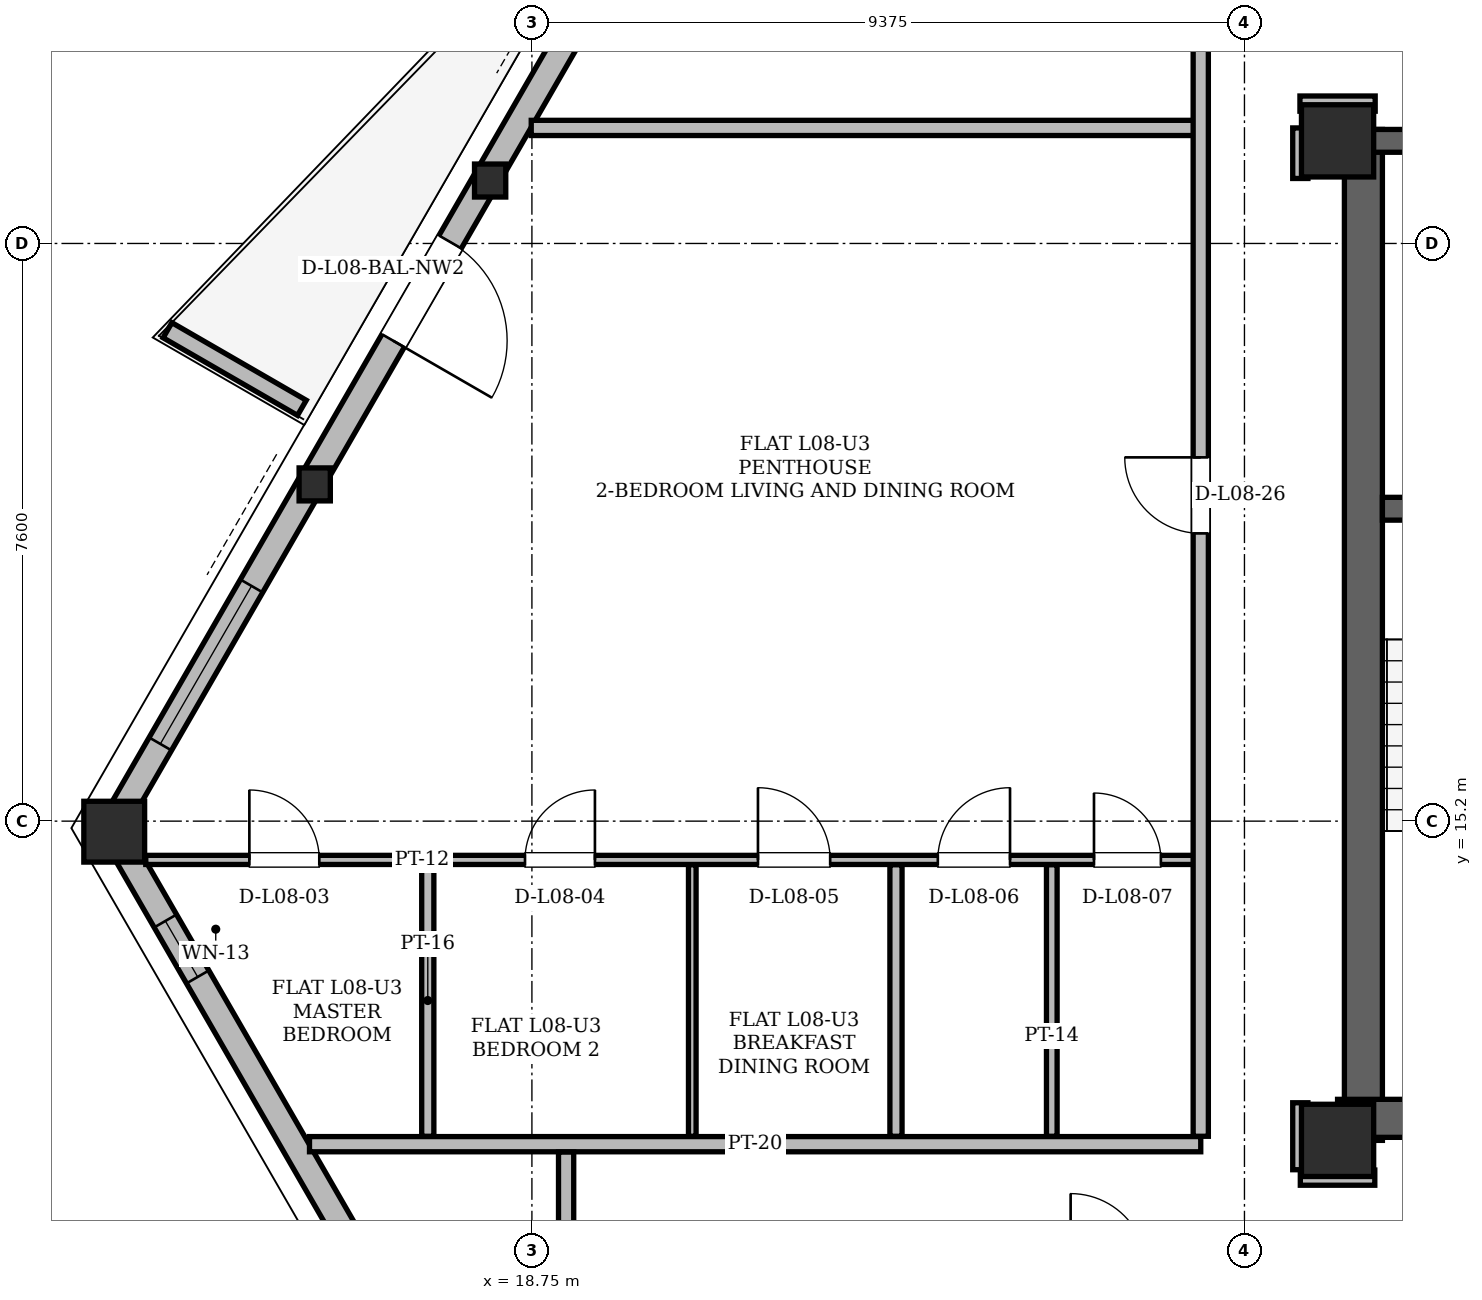
"""IFC4 building model, lengths in metres.
Left out: names, types, materials, properties, quantities, classifications, styles, units other than length and angle.
Written with IfcOpenShell. Run it as: python <this file> out.ifc"""

import sys

from ifc_helpers import new_model, si_unit, direction, frame, frame_2d, origin, origin_2d, place, context, subcontext, project, spatial, polyline, rectangle, hollow_rectangle, i_section, outline, extrude, element, fill, save


model = new_model("IFC4")
c1 = context("Model", 3, precision=1e-05, world=origin(), true_north=direction((0.0, 1.0)))
c2 = subcontext(c1, "Body", "Model", "MODEL_VIEW")
j1 = project(units=[si_unit("LENGTHUNIT", "METRE"), si_unit("PLANEANGLEUNIT", "RADIAN")], contexts=[c1])
p1 = place(None, origin())
s1 = spatial("IfcSite", under=j1, at=p1, CompositionType="ELEMENT")
p2 = place(p1, origin())
s2 = spatial("IfcBuilding", under=s1, at=p2, CompositionType="ELEMENT")
p3 = place(p2, frame((0.0, 0.0, 34.5)))
s3 = spatial("IfcBuildingStorey", under=s2, at=p3, CompositionType="ELEMENT", Elevation=34.5)
for number, where, z_axis, x_axis in (
    (1, (29.35, 11.0, 0.0), (0.0, 0.0, 1.0), (1.0, 0.0, 0.0)),
    (2, (29.35, 24.15, 0.0), (0.0, 0.0, 1.0), (1.0, 0.0, 0.0)),
):
    element("IfcColumn", number, at=place(p3, frame(where, z_axis=z_axis, x_axis=x_axis)), inside=s3, PredefinedType="COLUMN", context=c2, shape_type="SweptSolid", body=[
        extrude(hollow_rectangle(XDim=0.95, YDim=0.95, WallThickness=0.08, at=origin_2d()), origin(), (0.0, 0.0, 1.0), 3.6),
    ])
p4 = place(p3, frame((13.222, 15.108, 0.004), z_axis=(0.018142917842, -0.026229087217, 0.999491305373), x_axis=(0.822422232235, 0.568877554422, 0.0)))
e3 = element("IfcColumn", 3, at=p4, inside=s3, PredefinedType="COLUMN", context=c2, shape_type="SweptSolid", body=[
    extrude(hollow_rectangle(XDim=0.8, YDim=0.8, WallThickness=0.065, at=origin_2d()), origin(), (0.0, 0.0, 1.0), 3.593),
])
p5 = place(p3, frame((18.16, 23.662, 0.004), z_axis=(0.022221713768, -0.019163679763, 0.999569381692), x_axis=(0.653077047348, 0.757291469797, 0.0)))
e4 = element("IfcColumn", 4, at=p5, inside=s3, PredefinedType="COLUMN", context=c2, shape_type="SweptSolid", body=[
    extrude(i_section(OverallWidth=0.411, OverallDepth=0.434, WebThickness=0.036, FlangeThickness=0.057, at=origin_2d()), origin(), (0.0, 0.0, 1.0), 3.593),
])
p6 = place(p3, frame((15.856, 19.67, 0.004), z_axis=(0.020318381204, -0.022424969221, 0.999542037205), x_axis=(0.741056784611, 0.67144235939, 0.0)))
e5 = element("IfcColumn", 5, at=p6, inside=s3, PredefinedType="COLUMN", context=c2, shape_type="SweptSolid", body=[
    extrude(i_section(OverallWidth=0.411, OverallDepth=0.434, WebThickness=0.036, FlangeThickness=0.057, at=origin_2d()), origin(), (0.0, 0.0, 1.0), 3.593),
])
p7 = place(p3, frame((29.69, 11.0, 0.0), z_axis=(0.0, 0.0, 1.0), x_axis=(0.0, 1.0, 0.0)))
e6 = element("IfcWall", 6, at=p7, inside=s3, PredefinedType="SHEAR", context=c2, shape_type="SweptSolid", body=[
    extrude(rectangle(XDim=13.3, YDim=0.5, at=frame_2d((6.65, 0.0))), origin(), (0.0, 0.0, 1.0), 3.36),
])
p8 = place(p3, frame((29.35, 11.29, 0.0), z_axis=(0.0, 0.0, 1.0), x_axis=(1.0, 0.0, 0.0)))
e7 = element("IfcWall", 7, at=p8, inside=s3, PredefinedType="SHEAR", context=c2, shape_type="SweptSolid", body=[
    extrude(rectangle(XDim=7.1, YDim=0.5, at=frame_2d((3.55, 0.0))), origin(), (0.0, 0.0, 1.0), 3.36),
])
p9 = place(p3, frame((29.65, 24.15, 0.0), z_axis=(0.0, 0.0, 1.0), x_axis=(1.0, 0.0, 0.0)))
e8 = element("IfcWall", 8, at=p9, inside=s3, PredefinedType="SHEAR", context=c2, shape_type="SweptSolid", body=[
    extrude(rectangle(XDim=15.7, YDim=0.3, at=frame_2d((7.85, 0.0))), origin(), (0.0, 0.0, 1.0), 3.36),
])
p10 = place(p9, frame((1.7, 0.0, 0.0)))
e9 = element("IfcOpeningElement", 9, at=p10, cuts=e8, PredefinedType="OPENING", context=c2, shape_type="SweptSolid", body=[
    extrude(rectangle(XDim=1.2, YDim=2.2, at=frame_2d((0.6, 1.1))), frame((0.0, 0.15, 0.0), z_axis=(0.0, -1.0, 0.0), x_axis=(1.0, 0.0, 0.0)), (0.0, 0.0, 1.0), 0.3),
])
p11 = place(p9, frame((12.8, 0.0, 0.0)))
e10 = element("IfcOpeningElement", 10, at=p11, cuts=e8, PredefinedType="OPENING", context=c2, shape_type="SweptSolid", body=[
    extrude(rectangle(XDim=1.2, YDim=2.2, at=frame_2d((0.6, 1.1))), frame((0.0, 0.15, 0.0), z_axis=(0.0, -1.0, 0.0), x_axis=(1.0, 0.0, 0.0)), (0.0, 0.0, 1.0), 0.3),
])
p12 = place(p9, frame((6.55, 0.0, 0.0)))
e11 = element("IfcOpeningElement", 11, at=p12, cuts=e8, PredefinedType="OPENING", context=c2, shape_type="SweptSolid", body=[
    extrude(rectangle(XDim=0.9, YDim=2.05, at=frame_2d((0.45, 1.025))), frame((0.0, 0.15, 0.0), z_axis=(0.0, -1.0, 0.0), x_axis=(1.0, 0.0, 0.0)), (0.0, 0.0, 1.0), 0.3),
])
p13 = place(p9, frame((8.45, 0.0, 0.0)))
e12 = element("IfcOpeningElement", 12, at=p13, cuts=e8, PredefinedType="OPENING", context=c2, shape_type="SweptSolid", body=[
    extrude(rectangle(XDim=0.9, YDim=2.05, at=frame_2d((0.45, 1.025))), frame((0.0, 0.15, 0.0), z_axis=(0.0, -1.0, 0.0), x_axis=(1.0, 0.0, 0.0)), (0.0, 0.0, 1.0), 0.3),
])
p14 = place(p3, frame((29.94, 19.31, 0.0), z_axis=(0.0, 0.0, 1.0), x_axis=(1.0, 0.0, 0.0)))
e13 = element("IfcWall", 13, at=p14, inside=s3, PredefinedType="SHEAR", context=c2, shape_type="SweptSolid", body=[
    extrude(rectangle(XDim=4.01, YDim=0.3, at=frame_2d((2.005, 0.0))), origin(), (0.0, 0.0, 1.0), 3.36),
])
p15 = place(p14, frame((1.01, 0.0, 0.0)))
e14 = element("IfcOpeningElement", 14, at=p15, cuts=e13, PredefinedType="OPENING", context=c2, shape_type="SweptSolid", body=[
    extrude(rectangle(XDim=1.4, YDim=2.2, at=frame_2d((0.7, 1.1))), frame((0.0, 0.15, 0.0), z_axis=(0.0, -1.0, 0.0), x_axis=(1.0, 0.0, 0.0)), (0.0, 0.0, 1.0), 0.3),
])
p16 = place(p3, frame((13.222, 15.108, 0.0), z_axis=(0.0, 0.0, 1.0), x_axis=(0.499997339613, -0.866026939754, 0.0)))
e15 = element("IfcWall", 15, at=p16, inside=s3, PredefinedType="SOLIDWALL", context=c2, shape_type="SweptSolid", body=[
    extrude(rectangle(XDim=15.632, YDim=0.34, at=frame_2d((7.816, 0.0))), origin(), (0.0, 0.0, 1.0), 2.494),
])
p17 = place(p16, frame((1.411, 0.0, 1.28)))
e16 = element("IfcOpeningElement", 16, at=p17, cuts=e15, PredefinedType="OPENING", context=c2, shape_type="SweptSolid", body=[
    extrude(rectangle(XDim=0.85, YDim=0.92, at=frame_2d((0.425, 0.46))), frame((0.0, 0.17, 0.0), z_axis=(0.0, -1.0, 0.0), x_axis=(1.0, 0.0, 0.0)), (0.0, 0.0, 1.0), 0.34),
])
p18 = place(p3, frame((29.684, 43.621, 0.0), z_axis=(0.0, 0.0, 1.0), x_axis=(-0.499999106891, -0.866025919421, 0.0)))
e17 = element("IfcWall", 17, at=p18, inside=s3, PredefinedType="SOLIDWALL", context=c2, shape_type="SweptSolid", body=[
    extrude(rectangle(XDim=32.924, YDim=0.34, at=frame_2d((16.462, 0.0))), origin(), (0.0, 0.0, 1.0), 2.494),
])
p19 = place(p18, frame((6.159, 0.0, 0.0)))
e18 = element("IfcOpeningElement", 18, at=p19, cuts=e17, PredefinedType="OPENING", context=c2, shape_type="SweptSolid", body=[
    extrude(rectangle(XDim=1.5, YDim=2.2, at=frame_2d((0.75, 1.1))), frame((0.0, 0.17, 0.0), z_axis=(0.0, -1.0, 0.0), x_axis=(1.0, 0.0, 0.0)), (0.0, 0.0, 1.0), 0.34),
])
p20 = place(p18, frame((24.019, 0.0, 0.0)))
e19 = element("IfcOpeningElement", 19, at=p20, cuts=e17, PredefinedType="OPENING", context=c2, shape_type="SweptSolid", body=[
    extrude(rectangle(XDim=1.5, YDim=2.2, at=frame_2d((0.75, 1.1))), frame((0.0, 0.17, 0.0), z_axis=(0.0, -1.0, 0.0), x_axis=(1.0, 0.0, 0.0)), (0.0, 0.0, 1.0), 0.34),
])
p21 = place(p18, frame((29.245, 0.0, 0.85)))
e20 = element("IfcOpeningElement", 20, at=p21, cuts=e17, PredefinedType="OPENING", context=c2, shape_type="SweptSolid", body=[
    extrude(rectangle(XDim=2.4, YDim=1.534, at=frame_2d((1.2, 0.767))), frame((0.0, 0.17, 0.0), z_axis=(0.0, -1.0, 0.0), x_axis=(1.0, 0.0, 0.0)), (0.0, 0.0, 1.0), 0.34),
])
p22 = place(p18, frame((10.753, 0.0, 0.85)))
e21 = element("IfcOpeningElement", 21, at=p22, cuts=e17, PredefinedType="OPENING", context=c2, shape_type="SweptSolid", body=[
    extrude(rectangle(XDim=2.5, YDim=1.534, at=frame_2d((1.25, 0.767))), frame((0.0, 0.17, 0.0), z_axis=(0.0, -1.0, 0.0), x_axis=(1.0, 0.0, 0.0)), (0.0, 0.0, 1.0), 0.34),
])
p23 = place(p18, frame((17.723, 0.0, 0.85)))
e22 = element("IfcOpeningElement", 22, at=p23, cuts=e17, PredefinedType="OPENING", context=c2, shape_type="SweptSolid", body=[
    extrude(rectangle(XDim=2.4, YDim=1.534, at=frame_2d((1.2, 0.767))), frame((0.0, 0.17, 0.0), z_axis=(0.0, -1.0, 0.0), x_axis=(1.0, 0.0, 0.0)), (0.0, 0.0, 1.0), 0.34),
])
p24 = place(p18, frame((1.538, 0.0, 0.85)))
e23 = element("IfcOpeningElement", 23, at=p24, cuts=e17, PredefinedType="OPENING", context=c2, shape_type="SweptSolid", body=[
    extrude(rectangle(XDim=1.2, YDim=1.48, at=frame_2d((0.6, 0.74))), frame((0.0, 0.17, 0.0), z_axis=(0.0, -1.0, 0.0), x_axis=(1.0, 0.0, 0.0)), (0.0, 0.0, 1.0), 0.34),
])
p25 = place(p18, frame((0.69, 0.0, 0.85)))
e24 = element("IfcOpeningElement", 24, at=p25, cuts=e17, PredefinedType="OPENING", context=c2, shape_type="SweptSolid", body=[
    extrude(rectangle(XDim=0.7, YDim=1.2, at=frame_2d((0.35, 0.6))), frame((0.0, 0.17, 0.0), z_axis=(0.0, -1.0, 0.0), x_axis=(1.0, 0.0, 0.0)), (0.0, 0.0, 1.0), 0.34),
])
p26 = place(p3, frame((15.724, 20.638, 0.0), z_axis=(0.0, 0.0, 1.0), x_axis=(-0.866012356593, 0.500022597718, 0.0)))
e25 = element("IfcWall", 25, at=p26, inside=s3, PredefinedType="PARAPET", context=c2, shape_type="SweptSolid", body=[
    extrude(outline(polyline([(0.0, 0.0), (2.042, 0.0), (2.042, 1.1), (0.0, 1.32), (0.0, 0.0)])), frame((0.0, 0.115, 0.0), z_axis=(0.0, -1.0, 0.0), x_axis=(1.0, 0.0, 0.0)), (0.0, 0.0, 1.0), 0.23),
])
p27 = place(p3, frame((28.86, 10.51, 0.0), z_axis=(0.0, 0.0, 1.0), x_axis=(1.0, 0.0, 0.0)))
e26 = element("IfcWall", 26, at=p27, inside=s3, PredefinedType="PARTITIONING", context=c2, shape_type="SweptSolid", body=[
    extrude(rectangle(XDim=0.98, YDim=0.2, at=frame_2d((0.49, 0.0))), origin(), (0.0, 0.0, 1.0), 2.738),
])
p28 = place(p3, frame((15.824, 10.95, 0.0), z_axis=(0.0, 0.0, 1.0), x_axis=(1.0, 0.0, 0.0)))
e27 = element("IfcWall", 27, at=p28, inside=s3, PredefinedType="PARTITIONING", context=c2, shape_type="SweptSolid", body=[
    extrude(rectangle(XDim=11.726, YDim=0.2, at=frame_2d((5.863, 0.0))), origin(), (0.0, 0.0, 1.0), 3.36),
])
p29 = place(p3, frame((13.669, 14.69, 0.0), z_axis=(0.0, 0.0, 1.0), x_axis=(1.0, 0.0, 0.0)))
e28 = element("IfcWall", 28, at=p29, inside=s3, PredefinedType="PARTITIONING", context=c2, shape_type="SweptSolid", body=[
    extrude(rectangle(XDim=13.931, YDim=0.12, at=frame_2d((6.965, 0.0))), origin(), (0.0, 0.0, 1.0), 2.738),
])
p30 = place(p29, frame((1.363, 0.0, 0.0)))
e29 = element("IfcOpeningElement", 29, at=p30, cuts=e28, PredefinedType="OPENING", context=c2, shape_type="SweptSolid", body=[
    extrude(rectangle(XDim=0.92, YDim=2.12, at=frame_2d((0.46, 1.06))), frame((0.0, 0.06, 0.0), z_axis=(0.0, -1.0, 0.0), x_axis=(1.0, 0.0, 0.0)), (0.0, 0.0, 1.0), 0.12),
])
p31 = place(p29, frame((4.99, 0.0, 0.0)))
e30 = element("IfcOpeningElement", 30, at=p31, cuts=e28, PredefinedType="OPENING", context=c2, shape_type="SweptSolid", body=[
    extrude(rectangle(XDim=0.92, YDim=2.12, at=frame_2d((0.46, 1.06))), frame((0.0, 0.06, 0.0), z_axis=(0.0, -1.0, 0.0), x_axis=(1.0, 0.0, 0.0)), (0.0, 0.0, 1.0), 0.12),
])
p32 = place(p29, frame((8.055, 0.0, 0.0)))
e31 = element("IfcOpeningElement", 31, at=p32, cuts=e28, PredefinedType="OPENING", context=c2, shape_type="SweptSolid", body=[
    extrude(rectangle(XDim=0.95, YDim=2.1, at=frame_2d((0.475, 1.05))), frame((0.0, 0.06, 0.0), z_axis=(0.0, -1.0, 0.0), x_axis=(1.0, 0.0, 0.0)), (0.0, 0.0, 1.0), 0.12),
])
p33 = place(p29, frame((10.421, 0.0, 0.0)))
e32 = element("IfcOpeningElement", 32, at=p33, cuts=e28, PredefinedType="OPENING", context=c2, shape_type="SweptSolid", body=[
    extrude(rectangle(XDim=0.95, YDim=2.1, at=frame_2d((0.475, 1.05))), frame((0.0, 0.06, 0.0), z_axis=(0.0, -1.0, 0.0), x_axis=(1.0, 0.0, 0.0)), (0.0, 0.0, 1.0), 0.12),
])
p34 = place(p29, frame((12.476, 0.0, 0.0)))
e33 = element("IfcOpeningElement", 33, at=p34, cuts=e28, PredefinedType="OPENING", context=c2, shape_type="SweptSolid", body=[
    extrude(rectangle(XDim=0.88, YDim=2.08, at=frame_2d((0.44, 1.04))), frame((0.0, 0.06, 0.0), z_axis=(0.0, -1.0, 0.0), x_axis=(1.0, 0.0, 0.0)), (0.0, 0.0, 1.0), 0.12),
])
p35 = place(p3, frame((18.741, 24.32, 0.0), z_axis=(0.0, 0.0, 1.0), x_axis=(1.0, 0.0, 0.0)))
e34 = element("IfcWall", 34, at=p35, inside=s3, PredefinedType="PARTITIONING", context=c2, shape_type="SweptSolid", body=[
    extrude(rectangle(XDim=8.809, YDim=0.2, at=frame_2d((4.404, 0.0))), origin(), (0.0, 0.0, 1.0), 2.494),
])
p36 = place(p3, frame((28.855, 24.64, 0.0), z_axis=(0.0, 0.0, 1.0), x_axis=(1.0, 0.0, 0.0)))
e35 = element("IfcWall", 35, at=p36, inside=s3, PredefinedType="PARTITIONING", context=c2, shape_type="SweptSolid", body=[
    extrude(rectangle(XDim=0.99, YDim=0.2, at=frame_2d((0.495, 0.0))), origin(), (0.0, 0.0, 1.0), 2.738),
])
p37 = place(p3, frame((17.38, 11.054, 0.0), z_axis=(0.0, 0.0, 1.0), x_axis=(0.0, 1.0, 0.0)))
e36 = element("IfcWall", 36, at=p37, inside=s3, PredefinedType="PARTITIONING", context=c2, shape_type="SweptSolid", body=[
    extrude(rectangle(XDim=3.572, YDim=0.16, at=frame_2d((1.786, 0.0))), origin(), (0.0, 0.0, 1.0), 2.738),
])
p38 = place(p3, frame((19.2, 9.404, 0.0), z_axis=(0.0, 0.0, 1.0), x_axis=(0.0, 1.0, 0.0)))
e37 = element("IfcWall", 37, at=p38, inside=s3, PredefinedType="PARTITIONING", context=c2, shape_type="SweptSolid", body=[
    extrude(rectangle(XDim=1.442, YDim=0.2, at=frame_2d((0.721, 0.0))), origin(), (0.0, 0.0, 1.0), 3.36),
])
p39 = place(p3, frame((20.86, 11.054, 0.0), z_axis=(0.0, 0.0, 1.0), x_axis=(0.0, 1.0, 0.0)))
e38 = element("IfcWall", 38, at=p39, inside=s3, PredefinedType="PARTITIONING", context=c2, shape_type="SweptSolid", body=[
    extrude(rectangle(XDim=3.572, YDim=0.1, at=frame_2d((1.786, 0.0))), origin(), (0.0, 0.0, 1.0), 2.738),
])
p40 = place(p3, frame((23.54, 11.054, 0.0), z_axis=(0.0, 0.0, 1.0), x_axis=(0.0, 1.0, 0.0)))
e39 = element("IfcWall", 39, at=p40, inside=s3, PredefinedType="PARTITIONING", context=c2, shape_type="SweptSolid", body=[
    extrude(rectangle(XDim=3.572, YDim=0.16, at=frame_2d((1.786, 0.0))), origin(), (0.0, 0.0, 1.0), 2.738),
])
p41 = place(p3, frame((25.59, 11.054, 0.0), z_axis=(0.0, 0.0, 1.0), x_axis=(0.0, 1.0, 0.0)))
e40 = element("IfcWall", 40, at=p41, inside=s3, PredefinedType="PARTITIONING", context=c2, shape_type="SweptSolid", body=[
    extrude(rectangle(XDim=3.572, YDim=0.14, at=frame_2d((1.786, 0.0))), origin(), (0.0, 0.0, 1.0), 2.738),
])
p42 = place(p3, frame((27.55, 11.054, 0.0), z_axis=(0.0, 0.0, 1.0), x_axis=(0.0, 1.0, 0.0)))
e41 = element("IfcWall", 41, at=p42, inside=s3, PredefinedType="PARTITIONING", context=c2, shape_type="SweptSolid", body=[
    extrude(rectangle(XDim=14.812, YDim=0.2, at=frame_2d((7.406, 0.0))), origin(), (0.0, 0.0, 1.0), 2.738),
])
p43 = place(p42, frame((7.932, 0.0, 0.0)))
e42 = element("IfcOpeningElement", 42, at=p43, cuts=e41, PredefinedType="OPENING", context=c2, shape_type="SweptSolid", body=[
    extrude(rectangle(XDim=1.0, YDim=2.18, at=frame_2d((0.5, 1.09))), frame((0.0, 0.1, 0.0), z_axis=(0.0, -1.0, 0.0), x_axis=(1.0, 0.0, 0.0)), (0.0, 0.0, 1.0), 0.2),
])
p44 = place(p3, frame((28.86, 10.614, 0.0), z_axis=(0.0, 0.0, 1.0), x_axis=(0.0, 1.0, 0.0)))
e43 = element("IfcWall", 43, at=p44, inside=s3, PredefinedType="PARTITIONING", context=c2, shape_type="SweptSolid", body=[
    extrude(rectangle(XDim=0.881, YDim=0.2, at=frame_2d((0.44, 0.0))), origin(), (0.0, 0.0, 1.0), 2.738),
])
p45 = place(p3, frame((28.86, 23.655, 0.0), z_axis=(0.0, 0.0, 1.0), x_axis=(0.0, 1.0, 0.0)))
e44 = element("IfcWall", 44, at=p45, inside=s3, PredefinedType="PARTITIONING", context=c2, shape_type="SweptSolid", body=[
    extrude(rectangle(XDim=0.665, YDim=0.2, at=frame_2d((0.333, 0.0))), origin(), (0.0, 0.0, 1.0), 3.36),
])
p46 = place(p20, origin())
e45 = element("IfcDoor", 45, at=p46, inside=s3, OperationType="SINGLE_SWING_RIGHT", PredefinedType="DOOR", context=c2, shape_type="SweptSolid", body=[
    extrude(rectangle(XDim=1.5, YDim=2.2, at=frame_2d((0.75, 1.1))), frame((0.0, 0.025, 0.0), z_axis=(0.0, -1.0, 0.0), x_axis=(1.0, 0.0, 0.0)), (0.0, 0.0, 1.0), 0.05),
])
fill(e19, e45)
p47 = place(p21, origin())
e46 = element("IfcWindow", 46, at=p47, inside=s3, PartitioningType="SINGLE_PANEL", PredefinedType="WINDOW", context=c2, shape_type="SweptSolid", body=[
    extrude(rectangle(XDim=2.4, YDim=1.534, at=frame_2d((1.2, 0.767))), frame((0.0, 0.03, 0.0), z_axis=(0.0, -1.0, 0.0), x_axis=(1.0, 0.0, 0.0)), (0.0, 0.0, 1.0), 0.06),
])
fill(e20, e46)
p48 = place(p17, origin())
e47 = element("IfcWindow", 47, at=p48, inside=s3, PartitioningType="SINGLE_PANEL", PredefinedType="WINDOW", context=c2, shape_type="SweptSolid", body=[
    extrude(rectangle(XDim=0.85, YDim=0.92, at=frame_2d((0.425, 0.46))), frame((0.0, 0.03, 0.0), z_axis=(0.0, -1.0, 0.0), x_axis=(1.0, 0.0, 0.0)), (0.0, 0.0, 1.0), 0.06),
])
fill(e16, e47)
p49 = place(p30, origin())
e48 = element("IfcDoor", 48, at=p49, inside=s3, OperationType="SINGLE_SWING_LEFT", PredefinedType="DOOR", context=c2, shape_type="SweptSolid", body=[
    extrude(rectangle(XDim=0.92, YDim=2.12, at=frame_2d((0.46, 1.06))), frame((0.0, 0.025, 0.0), z_axis=(0.0, -1.0, 0.0), x_axis=(1.0, 0.0, 0.0)), (0.0, 0.0, 1.0), 0.05),
])
fill(e29, e48)
p50 = place(p31, origin())
e49 = element("IfcDoor", 49, at=p50, inside=s3, OperationType="SINGLE_SWING_RIGHT", PredefinedType="DOOR", context=c2, shape_type="SweptSolid", body=[
    extrude(rectangle(XDim=0.92, YDim=2.12, at=frame_2d((0.46, 1.06))), frame((0.0, 0.025, 0.0), z_axis=(0.0, -1.0, 0.0), x_axis=(1.0, 0.0, 0.0)), (0.0, 0.0, 1.0), 0.05),
])
fill(e30, e49)
p51 = place(p32, origin())
e50 = element("IfcDoor", 50, at=p51, inside=s3, OperationType="SINGLE_SWING_LEFT", PredefinedType="DOOR", context=c2, shape_type="SweptSolid", body=[
    extrude(rectangle(XDim=0.95, YDim=2.1, at=frame_2d((0.475, 1.05))), frame((0.0, 0.025, 0.0), z_axis=(0.0, -1.0, 0.0), x_axis=(1.0, 0.0, 0.0)), (0.0, 0.0, 1.0), 0.05),
])
fill(e31, e50)
p52 = place(p33, origin())
e51 = element("IfcDoor", 51, at=p52, inside=s3, OperationType="SINGLE_SWING_RIGHT", PredefinedType="DOOR", context=c2, shape_type="SweptSolid", body=[
    extrude(rectangle(XDim=0.95, YDim=2.1, at=frame_2d((0.475, 1.05))), frame((0.0, 0.025, 0.0), z_axis=(0.0, -1.0, 0.0), x_axis=(1.0, 0.0, 0.0)), (0.0, 0.0, 1.0), 0.05),
])
fill(e32, e51)
p53 = place(p34, origin())
e52 = element("IfcDoor", 52, at=p53, inside=s3, OperationType="SINGLE_SWING_LEFT", PredefinedType="DOOR", context=c2, shape_type="SweptSolid", body=[
    extrude(rectangle(XDim=0.88, YDim=2.08, at=frame_2d((0.44, 1.04))), frame((0.0, 0.025, 0.0), z_axis=(0.0, -1.0, 0.0), x_axis=(1.0, 0.0, 0.0)), (0.0, 0.0, 1.0), 0.05),
])
fill(e33, e52)
p54 = place(p43, origin())
e53 = element("IfcDoor", 53, at=p54, inside=s3, OperationType="SINGLE_SWING_RIGHT", PredefinedType="DOOR", context=c2, shape_type="SweptSolid", body=[
    extrude(rectangle(XDim=1.0, YDim=2.18, at=frame_2d((0.5, 1.09))), frame((0.0, 0.025, 0.0), z_axis=(0.0, -1.0, 0.0), x_axis=(1.0, 0.0, 0.0)), (0.0, 0.0, 1.0), 0.05),
])
fill(e42, e53)
save(model, sys.argv[1])
